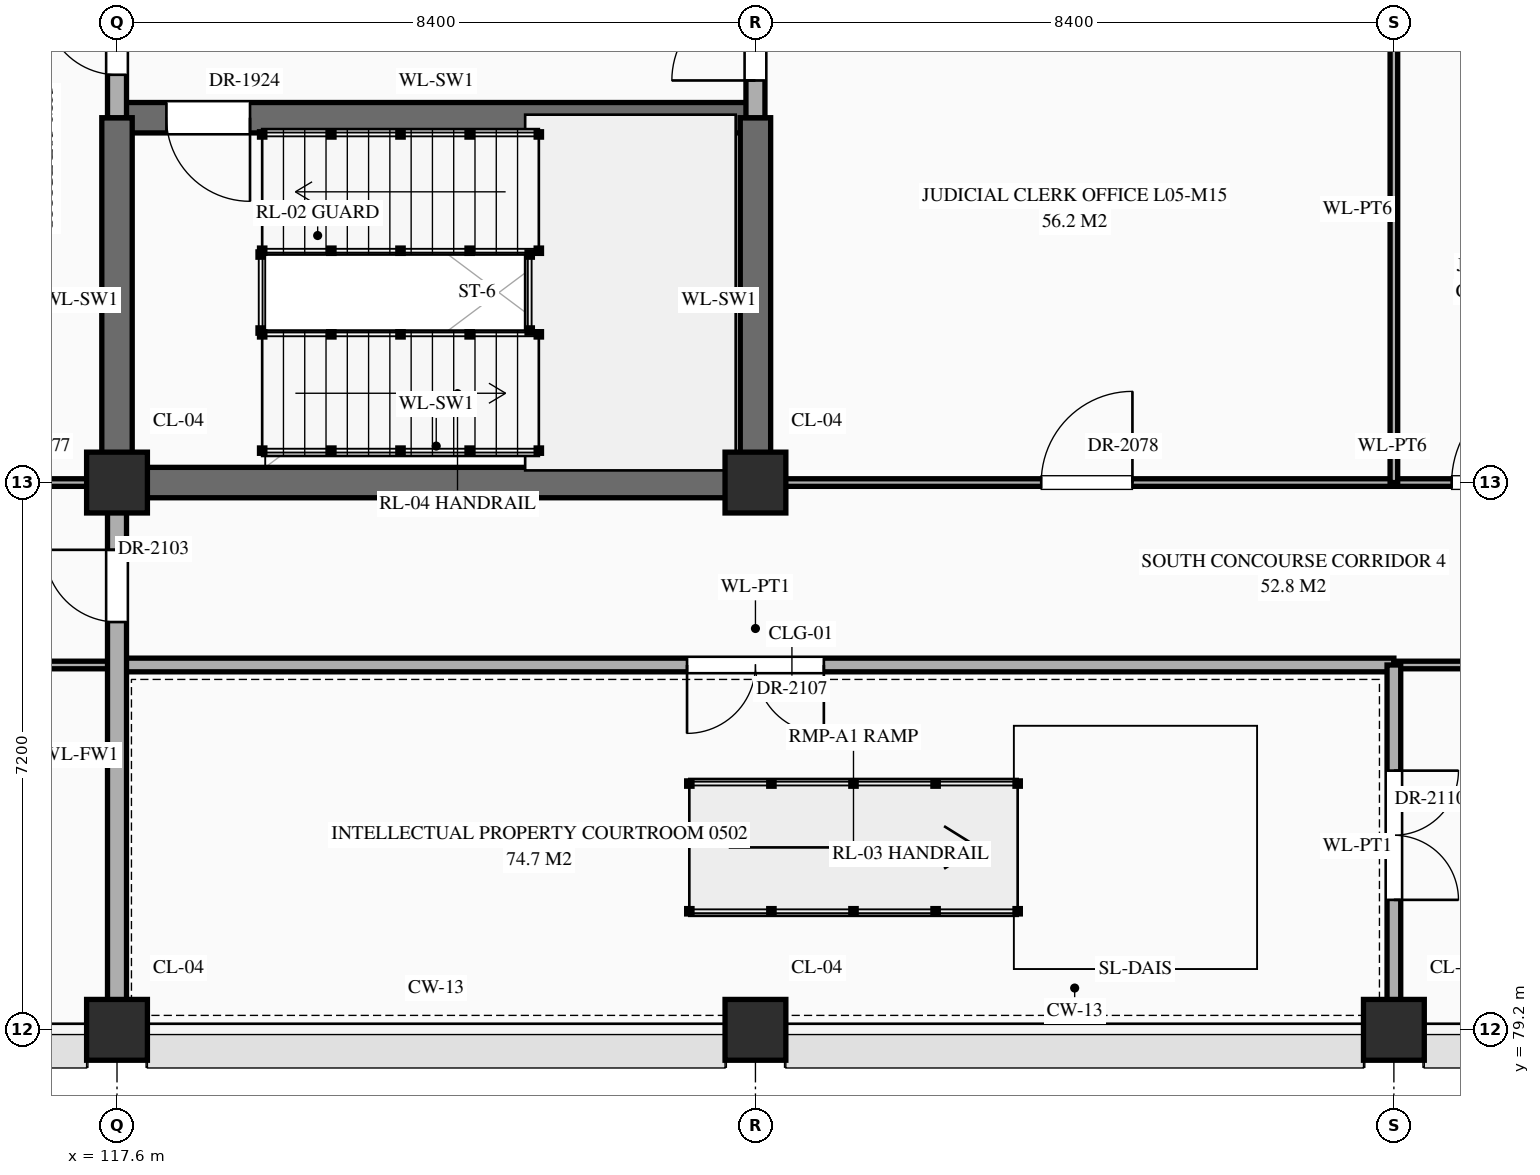
"""IFC4 building model, lengths in metres.
Left out: names, types, materials, properties, quantities, classifications, styles, units other than length and angle.
Written with IfcOpenShell. Run it as: python <this file> out.ifc"""

import sys

from ifc_helpers import new_model, si_unit, direction, frame, frame_2d, origin, origin_2d, place, context, subcontext, project, spatial, rectangle, extrude, element, fill, save


model = new_model("IFC4")
c1 = context("Model", 3, precision=1e-05, world=origin(), true_north=direction((0.0, 1.0)))
c2 = subcontext(c1, "Body", "Model", "MODEL_VIEW")
j1 = project(units=[si_unit("LENGTHUNIT", "METRE"), si_unit("PLANEANGLEUNIT", "RADIAN")], contexts=[c1])
p1 = place(None, origin())
s1 = spatial("IfcSite", under=j1, at=p1, CompositionType="ELEMENT")
p2 = place(p1, origin())
s2 = spatial("IfcBuilding", under=s1, at=p2, CompositionType="ELEMENT")
p3 = place(p2, frame((0.0, 0.0, 21.6)))
s3 = spatial("IfcBuildingStorey", under=s2, at=p3, CompositionType="ELEMENT", Elevation=21.6)
for number, where, z_axis, x_axis in (
    (1, (117.6, 79.2, 0.0), (0.0, 0.0, 1.0), (1.0, 0.0, 0.0)),
    (2, (117.6, 86.4, 0.0), (0.0, 0.0, 1.0), (1.0, 0.0, 0.0)),
    (3, (126.0, 79.2, 0.0), (0.0, 0.0, 1.0), (1.0, 0.0, 0.0)),
    (4, (126.0, 86.4, 0.0), (0.0, 0.0, 1.0), (1.0, 0.0, 0.0)),
    (5, (134.4, 79.2, 0.0), (0.0, 0.0, 1.0), (1.0, 0.0, 0.0)),
):
    element("IfcColumn", number, at=place(p3, frame(where, z_axis=z_axis, x_axis=x_axis)), inside=s3, PredefinedType="COLUMN", context=c2, shape_type="SweptSolid", body=[
        extrude(rectangle(XDim=0.8, YDim=0.8, at=origin_2d()), origin(), (0.0, 0.0, 1.0), 4.5),
    ])
p4 = place(p3, frame((100.8, 84.0, 0.0), z_axis=(0.0, 0.0, 1.0), x_axis=(1.0, 0.0, 0.0)))
e6 = element("IfcWall", 6, at=p4, inside=s3, PredefinedType="STANDARD", context=c2, shape_type="SweptSolid", body=[
    extrude(rectangle(XDim=16.8, YDim=0.1, at=frame_2d((8.4, 0.0))), origin(), (0.0, 0.0, 1.0), 4.24),
])
p5 = place(p4, frame((3.74, 0.0, 0.0)))
e7 = element("IfcOpeningElement", 7, at=p5, cuts=e6, PredefinedType="OPENING", context=c2, shape_type="SweptSolid", body=[
    extrude(rectangle(XDim=0.92, YDim=2.15, at=frame_2d((0.46, 1.075))), frame((0.0, 0.062, 0.0), z_axis=(0.0, -1.0, 0.0), x_axis=(1.0, 0.0, 0.0)), (0.0, 0.0, 1.0), 0.124),
])
p6 = place(p4, frame((12.12, 0.0, 0.0)))
e8 = element("IfcOpeningElement", 8, at=p6, cuts=e6, PredefinedType="OPENING", context=c2, shape_type="SweptSolid", body=[
    extrude(rectangle(XDim=0.96, YDim=2.2, at=frame_2d((0.48, 1.1))), frame((0.0, 0.062, 0.0), z_axis=(0.0, -1.0, 0.0), x_axis=(1.0, 0.0, 0.0)), (0.0, 0.0, 1.0), 0.124),
])
p7 = place(p3, frame((117.6, 84.0, 0.0), z_axis=(0.0, 0.0, 1.0), x_axis=(1.0, 0.0, 0.0)))
e9 = element("IfcWall", 9, at=p7, inside=s3, PredefinedType="STANDARD", context=c2, shape_type="SweptSolid", body=[
    extrude(rectangle(XDim=16.8, YDim=0.18, at=frame_2d((8.4, 0.0))), origin(), (0.0, 0.0, 1.0), 4.24),
])
p8 = place(p7, frame((7.5, 0.0, 0.0)))
e10 = element("IfcOpeningElement", 10, at=p8, cuts=e9, PredefinedType="OPENING", context=c2, shape_type="SweptSolid", body=[
    extrude(rectangle(XDim=1.8, YDim=2.5, at=frame_2d((0.9, 1.25))), frame((0.0, 0.102, 0.0), z_axis=(0.0, -1.0, 0.0), x_axis=(1.0, 0.0, 0.0)), (0.0, 0.0, 1.0), 0.204),
])
p9 = place(p3, frame((134.4, 84.0, 0.0), z_axis=(0.0, 0.0, 1.0), x_axis=(1.0, 0.0, 0.0)))
e11 = element("IfcWall", 11, at=p9, inside=s3, PredefinedType="STANDARD", context=c2, shape_type="SweptSolid", body=[
    extrude(rectangle(XDim=8.36, YDim=0.1, at=frame_2d((4.18, 0.0))), origin(), (0.0, 0.0, 1.0), 4.24),
])
p10 = place(p9, frame((3.355, 0.0, 0.0)))
e12 = element("IfcOpeningElement", 12, at=p10, cuts=e11, PredefinedType="OPENING", context=c2, shape_type="SweptSolid", body=[
    extrude(rectangle(XDim=1.65, YDim=2.4, at=frame_2d((0.825, 1.2))), frame((0.0, 0.062, 0.0), z_axis=(0.0, -1.0, 0.0), x_axis=(1.0, 0.0, 0.0)), (0.0, 0.0, 1.0), 0.124),
])
p11 = place(p3, frame((109.2, 86.4, 0.0), z_axis=(0.0, 0.0, 1.0), x_axis=(1.0, 0.0, 0.0)))
e13 = element("IfcWall", 13, at=p11, inside=s3, PredefinedType="STANDARD", context=c2, shape_type="SweptSolid", body=[
    extrude(rectangle(XDim=8.4, YDim=0.1, at=frame_2d((4.2, 0.0))), origin(), (0.0, 0.0, 1.0), 3.39),
])
p12 = place(p11, frame((1.04, 0.0, 0.0)))
e14 = element("IfcOpeningElement", 14, at=p12, cuts=e13, PredefinedType="OPENING", context=c2, shape_type="SweptSolid", body=[
    extrude(rectangle(XDim=1.04, YDim=2.2, at=frame_2d((0.52, 1.1))), frame((0.0, 0.062, 0.0), z_axis=(0.0, -1.0, 0.0), x_axis=(1.0, 0.0, 0.0)), (0.0, 0.0, 1.0), 0.124),
])
p13 = place(p11, frame((3.64, 0.0, 0.0)))
e15 = element("IfcOpeningElement", 15, at=p13, cuts=e13, PredefinedType="OPENING", context=c2, shape_type="SweptSolid", body=[
    extrude(rectangle(XDim=1.12, YDim=2.25, at=frame_2d((0.56, 1.125))), frame((0.0, 0.062, 0.0), z_axis=(0.0, -1.0, 0.0), x_axis=(1.0, 0.0, 0.0)), (0.0, 0.0, 1.0), 0.124),
])
p14 = place(p11, frame((6.26, 0.0, 0.0)))
e16 = element("IfcOpeningElement", 16, at=p14, cuts=e13, PredefinedType="OPENING", context=c2, shape_type="SweptSolid", body=[
    extrude(rectangle(XDim=1.16, YDim=2.3, at=frame_2d((0.58, 1.15))), frame((0.0, 0.062, 0.0), z_axis=(0.0, -1.0, 0.0), x_axis=(1.0, 0.0, 0.0)), (0.0, 0.0, 1.0), 0.124),
])
p15 = place(p3, frame((117.6, 86.4, 0.0), z_axis=(0.0, 0.0, 1.0), x_axis=(1.0, 0.0, 0.0)))
e17 = element("IfcWall", 17, at=p15, inside=s3, PredefinedType="SHEAR", context=c2, shape_type="SweptSolid", body=[
    extrude(rectangle(XDim=8.4, YDim=0.4, at=frame_2d((4.2, 0.0))), origin(), (0.0, 0.0, 1.0), 4.24),
])
p16 = place(p3, frame((126.0, 86.4, 0.0), z_axis=(0.0, 0.0, 1.0), x_axis=(1.0, 0.0, 0.0)))
e18 = element("IfcWall", 18, at=p16, inside=s3, PredefinedType="STANDARD", context=c2, shape_type="SweptSolid", body=[
    extrude(rectangle(XDim=16.76, YDim=0.1, at=frame_2d((8.38, 0.0))), origin(), (0.0, 0.0, 1.0), 3.19),
])
p17 = place(p16, frame((3.76, 0.0, 0.0)))
e19 = element("IfcOpeningElement", 19, at=p17, cuts=e18, PredefinedType="OPENING", context=c2, shape_type="SweptSolid", body=[
    extrude(rectangle(XDim=1.2, YDim=2.35, at=frame_2d((0.6, 1.175))), frame((0.0, 0.062, 0.0), z_axis=(0.0, -1.0, 0.0), x_axis=(1.0, 0.0, 0.0)), (0.0, 0.0, 1.0), 0.124),
])
p18 = place(p16, frame((9.16, 0.0, 0.0)))
e20 = element("IfcOpeningElement", 20, at=p18, cuts=e18, PredefinedType="OPENING", context=c2, shape_type="SweptSolid", body=[
    extrude(rectangle(XDim=1.28, YDim=2.35, at=frame_2d((0.64, 1.175))), frame((0.0, 0.062, 0.0), z_axis=(0.0, -1.0, 0.0), x_axis=(1.0, 0.0, 0.0)), (0.0, 0.0, 1.0), 0.124),
])
p19 = place(p16, frame((11.65, 0.0, 0.0)))
e21 = element("IfcOpeningElement", 21, at=p19, cuts=e18, PredefinedType="OPENING", context=c2, shape_type="SweptSolid", body=[
    extrude(rectangle(XDim=1.9, YDim=2.5, at=frame_2d((0.95, 1.25))), frame((0.0, 0.062, 0.0), z_axis=(0.0, -1.0, 0.0), x_axis=(1.0, 0.0, 0.0)), (0.0, 0.0, 1.0), 0.124),
])
p20 = place(p16, frame((14.73, 0.0, 0.0)))
e22 = element("IfcOpeningElement", 22, at=p20, cuts=e18, PredefinedType="OPENING", context=c2, shape_type="SweptSolid", body=[
    extrude(rectangle(XDim=1.02, YDim=2.4, at=frame_2d((0.51, 1.2))), frame((0.0, 0.062, 0.0), z_axis=(0.0, -1.0, 0.0), x_axis=(1.0, 0.0, 0.0)), (0.0, 0.0, 1.0), 0.124),
])
p21 = place(p3, frame((117.6, 91.2, 0.0), z_axis=(0.0, 0.0, 1.0), x_axis=(1.0, 0.0, 0.0)))
e23 = element("IfcWall", 23, at=p21, inside=s3, PredefinedType="SHEAR", context=c2, shape_type="SweptSolid", body=[
    extrude(rectangle(XDim=8.4, YDim=0.4, at=frame_2d((4.2, 0.0))), origin(), (0.0, 0.0, 1.0), 4.24),
])
p22 = place(p21, frame((0.65, 0.0, 0.0)))
e24 = element("IfcOpeningElement", 24, at=p22, cuts=e23, PredefinedType="OPENING", context=c2, shape_type="SweptSolid", body=[
    extrude(rectangle(XDim=1.1, YDim=2.2, at=frame_2d((0.55, 1.1))), frame((0.0, 0.212, 0.0), z_axis=(0.0, -1.0, 0.0), x_axis=(1.0, 0.0, 0.0)), (0.0, 0.0, 1.0), 0.424),
])
p23 = place(p3, frame((117.6, 79.24, 0.0), z_axis=(0.0, 0.0, 1.0), x_axis=(0.0, 1.0, 0.0)))
e25 = element("IfcWall", 25, at=p23, inside=s3, PredefinedType="STANDARD", context=c2, shape_type="SweptSolid", body=[
    extrude(rectangle(XDim=7.16, YDim=0.25, at=frame_2d((3.58, 0.0))), origin(), (0.0, 0.0, 1.0), 3.49),
])
p24 = place(p23, frame((5.325, 0.0, 0.0)))
e26 = element("IfcOpeningElement", 26, at=p24, cuts=e25, PredefinedType="OPENING", context=c2, shape_type="SweptSolid", body=[
    extrude(rectangle(XDim=0.95, YDim=2.15, at=frame_2d((0.475, 1.075))), frame((0.0, 0.137, 0.0), z_axis=(0.0, -1.0, 0.0), x_axis=(1.0, 0.0, 0.0)), (0.0, 0.0, 1.0), 0.274),
])
p25 = place(p3, frame((117.6, 86.4, 0.0), z_axis=(0.0, 0.0, 1.0), x_axis=(0.0, 1.0, 0.0)))
e27 = element("IfcWall", 27, at=p25, inside=s3, PredefinedType="SHEAR", context=c2, shape_type="SweptSolid", body=[
    extrude(rectangle(XDim=4.8, YDim=0.4, at=frame_2d((2.4, 0.0))), origin(), (0.0, 0.0, 1.0), 4.24),
])
p26 = place(p3, frame((117.6, 91.2, 0.0), z_axis=(0.0, 0.0, 1.0), x_axis=(0.0, 1.0, 0.0)))
e28 = element("IfcWall", 28, at=p26, inside=s3, PredefinedType="STANDARD", context=c2, shape_type="SweptSolid", body=[
    extrude(rectangle(XDim=13.2, YDim=0.25, at=frame_2d((6.6, 0.0))), origin(), (0.0, 0.0, 1.0), 3.49),
])
p27 = place(p26, frame((0.565, 0.0, 0.0)))
e29 = element("IfcOpeningElement", 29, at=p27, cuts=e28, PredefinedType="OPENING", context=c2, shape_type="SweptSolid", body=[
    extrude(rectangle(XDim=0.95, YDim=2.15, at=frame_2d((0.475, 1.075))), frame((0.0, 0.137, 0.0), z_axis=(0.0, -1.0, 0.0), x_axis=(1.0, 0.0, 0.0)), (0.0, 0.0, 1.0), 0.274),
])
p28 = place(p26, frame((10.41, 0.0, 0.0)))
e30 = element("IfcOpeningElement", 30, at=p28, cuts=e28, PredefinedType="OPENING", context=c2, shape_type="SweptSolid", body=[
    extrude(rectangle(XDim=1.1, YDim=2.2, at=frame_2d((0.55, 1.1))), frame((0.0, 0.137, 0.0), z_axis=(0.0, -1.0, 0.0), x_axis=(1.0, 0.0, 0.0)), (0.0, 0.0, 1.0), 0.274),
])
p29 = place(p26, frame((3.21, 0.0, 0.0)))
e31 = element("IfcOpeningElement", 31, at=p29, cuts=e28, PredefinedType="OPENING", context=c2, shape_type="SweptSolid", body=[
    extrude(rectangle(XDim=1.1, YDim=2.2, at=frame_2d((0.55, 1.1))), frame((0.0, 0.137, 0.0), z_axis=(0.0, -1.0, 0.0), x_axis=(1.0, 0.0, 0.0)), (0.0, 0.0, 1.0), 0.274),
])
p30 = place(p3, frame((126.0, 86.4, 0.0), z_axis=(0.0, 0.0, 1.0), x_axis=(0.0, 1.0, 0.0)))
e32 = element("IfcWall", 32, at=p30, inside=s3, PredefinedType="SHEAR", context=c2, shape_type="SweptSolid", body=[
    extrude(rectangle(XDim=4.8, YDim=0.4, at=frame_2d((2.4, 0.0))), origin(), (0.0, 0.0, 1.0), 4.24),
])
p31 = place(p3, frame((126.0, 91.2, 0.0), z_axis=(0.0, 0.0, 1.0), x_axis=(0.0, 1.0, 0.0)))
e33 = element("IfcWall", 33, at=p31, inside=s3, PredefinedType="STANDARD", context=c2, shape_type="SweptSolid", body=[
    extrude(rectangle(XDim=2.4, YDim=0.25, at=frame_2d((1.2, 0.0))), origin(), (0.0, 0.0, 1.0), 3.49),
])
p32 = place(p31, frame((0.49, 0.0, 0.0)))
e34 = element("IfcOpeningElement", 34, at=p32, cuts=e33, PredefinedType="OPENING", context=c2, shape_type="SweptSolid", body=[
    extrude(rectangle(XDim=1.1, YDim=2.2, at=frame_2d((0.55, 1.1))), frame((0.0, 0.137, 0.0), z_axis=(0.0, -1.0, 0.0), x_axis=(1.0, 0.0, 0.0)), (0.0, 0.0, 1.0), 0.274),
])
p33 = place(p3, frame((134.4, 79.24, 0.0), z_axis=(0.0, 0.0, 1.0), x_axis=(0.0, 1.0, 0.0)))
e35 = element("IfcWall", 35, at=p33, inside=s3, PredefinedType="STANDARD", context=c2, shape_type="SweptSolid", body=[
    extrude(rectangle(XDim=4.76, YDim=0.18, at=frame_2d((2.38, 0.0))), origin(), (0.0, 0.0, 1.0), 4.24),
])
p34 = place(p33, frame((1.67, 0.0, 0.0)))
e36 = element("IfcOpeningElement", 36, at=p34, cuts=e35, PredefinedType="OPENING", context=c2, shape_type="SweptSolid", body=[
    extrude(rectangle(XDim=1.7, YDim=2.45, at=frame_2d((0.85, 1.225))), frame((0.0, 0.102, 0.0), z_axis=(0.0, -1.0, 0.0), x_axis=(1.0, 0.0, 0.0)), (0.0, 0.0, 1.0), 0.204),
])
p35 = place(p3, frame((134.4, 86.4, 0.0), z_axis=(0.0, 0.0, 1.0), x_axis=(0.0, 1.0, 0.0)))
e37 = element("IfcWall", 37, at=p35, inside=s3, PredefinedType="STANDARD", context=c2, shape_type="SweptSolid", body=[
    extrude(rectangle(XDim=7.2, YDim=0.1, at=frame_2d((3.6, 0.0))), origin(), (0.0, 0.0, 1.0), 4.24),
])
p36 = place(p22, frame((1.1, 0.0, 0.0), z_axis=(0.0, 0.0, 1.0), x_axis=(-1.0, 0.0, 0.0)))
e38 = element("IfcDoor", 38, at=p36, inside=s3, OperationType="SINGLE_SWING_LEFT", PredefinedType="DOOR", context=c2, shape_type="SweptSolid", body=[
    extrude(rectangle(XDim=1.1, YDim=2.2, at=frame_2d((0.55, 1.1))), frame((0.0, 0.025, 0.0), z_axis=(0.0, -1.0, 0.0), x_axis=(1.0, 0.0, 0.0)), (0.0, 0.0, 1.0), 0.05),
])
fill(e24, e38)
p37 = place(p27, origin())
e39 = element("IfcDoor", 39, at=p37, inside=s3, OperationType="SINGLE_SWING_RIGHT", PredefinedType="DOOR", context=c2, shape_type="SweptSolid", body=[
    extrude(rectangle(XDim=0.95, YDim=2.15, at=frame_2d((0.475, 1.075))), frame((0.0, 0.025, 0.0), z_axis=(0.0, -1.0, 0.0), x_axis=(1.0, 0.0, 0.0)), (0.0, 0.0, 1.0), 0.05),
])
fill(e29, e39)
p38 = place(p32, origin())
e40 = element("IfcDoor", 40, at=p38, inside=s3, OperationType="SINGLE_SWING_LEFT", PredefinedType="DOOR", context=c2, shape_type="SweptSolid", body=[
    extrude(rectangle(XDim=1.1, YDim=2.2, at=frame_2d((0.55, 1.1))), frame((0.0, 0.025, 0.0), z_axis=(0.0, -1.0, 0.0), x_axis=(1.0, 0.0, 0.0)), (0.0, 0.0, 1.0), 0.05),
])
fill(e34, e40)
p39 = place(p17, origin())
e41 = element("IfcDoor", 41, at=p39, inside=s3, OperationType="SINGLE_SWING_RIGHT", PredefinedType="DOOR", context=c2, shape_type="SweptSolid", body=[
    extrude(rectangle(XDim=1.2, YDim=2.35, at=frame_2d((0.6, 1.175))), frame((0.0, 0.025, 0.0), z_axis=(0.0, -1.0, 0.0), x_axis=(1.0, 0.0, 0.0)), (0.0, 0.0, 1.0), 0.05),
])
fill(e19, e41)
p40 = place(p18, origin())
e42 = element("IfcDoor", 42, at=p40, inside=s3, OperationType="SINGLE_SWING_RIGHT", PredefinedType="DOOR", context=c2, shape_type="SweptSolid", body=[
    extrude(rectangle(XDim=1.28, YDim=2.35, at=frame_2d((0.64, 1.175))), frame((0.0, 0.025, 0.0), z_axis=(0.0, -1.0, 0.0), x_axis=(1.0, 0.0, 0.0)), (0.0, 0.0, 1.0), 0.05),
])
fill(e20, e42)
p41 = place(p24, origin())
e43 = element("IfcDoor", 43, at=p41, inside=s3, OperationType="SINGLE_SWING_RIGHT", PredefinedType="DOOR", context=c2, shape_type="SweptSolid", body=[
    extrude(rectangle(XDim=0.95, YDim=2.15, at=frame_2d((0.475, 1.075))), frame((0.0, 0.025, 0.0), z_axis=(0.0, -1.0, 0.0), x_axis=(1.0, 0.0, 0.0)), (0.0, 0.0, 1.0), 0.05),
])
fill(e26, e43)
p42 = place(p8, frame((1.8, 0.0, 0.0), z_axis=(0.0, 0.0, 1.0), x_axis=(-1.0, 0.0, 0.0)))
e44 = element("IfcDoor", 44, at=p42, inside=s3, OperationType="DOUBLE_DOOR_SINGLE_SWING", PredefinedType="DOOR", context=c2, shape_type="SweptSolid", body=[
    extrude(rectangle(XDim=1.8, YDim=2.5, at=frame_2d((0.9, 1.25))), frame((0.0, 0.025, 0.0), z_axis=(0.0, -1.0, 0.0), x_axis=(1.0, 0.0, 0.0)), (0.0, 0.0, 1.0), 0.05),
])
fill(e10, e44)
p43 = place(p34, frame((1.7, 0.0, 0.0), z_axis=(0.0, 0.0, 1.0), x_axis=(-1.0, 0.0, 0.0)))
e45 = element("IfcDoor", 45, at=p43, inside=s3, OperationType="DOUBLE_DOOR_SINGLE_SWING", PredefinedType="DOOR", context=c2, shape_type="SweptSolid", body=[
    extrude(rectangle(XDim=1.7, YDim=2.45, at=frame_2d((0.85, 1.225))), frame((0.0, 0.025, 0.0), z_axis=(0.0, -1.0, 0.0), x_axis=(1.0, 0.0, 0.0)), (0.0, 0.0, 1.0), 0.05),
])
fill(e36, e45)
save(model, sys.argv[1])
